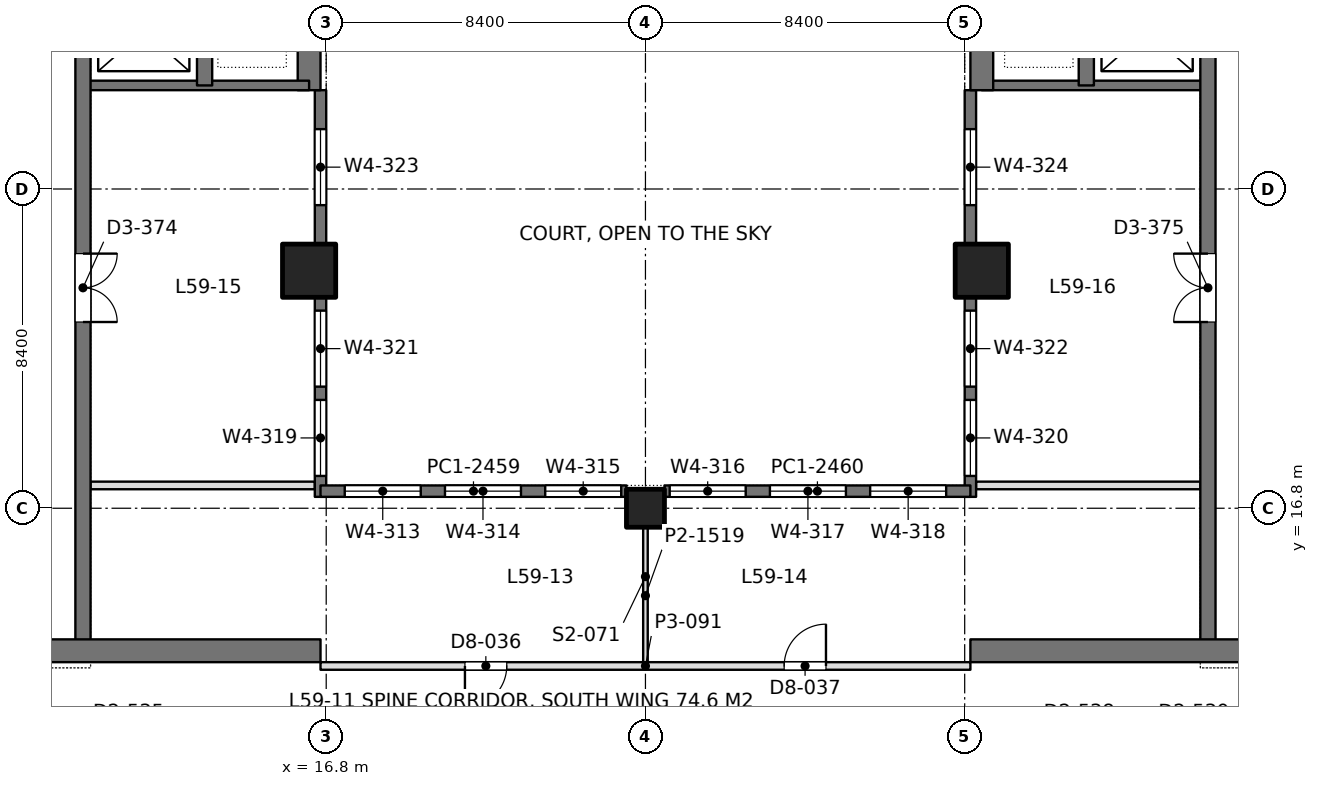
"""IFC4 building model, lengths in metres.
Left out: names, types, materials, properties, quantities, classifications, styles, units other than length and angle.
Written with IfcOpenShell. Run it as: python <this file> out.ifc"""

import sys

from ifc_helpers import new_model, si_unit, direction, frame, frame_2d, origin, origin_2d, place, context, subcontext, project, spatial, rectangle, extrude, element, fill, save


model = new_model("IFC4")
c1 = context("Model", 3, precision=1e-05, world=origin(), true_north=direction((0.0, 1.0)))
c2 = subcontext(c1, "Body", "Model", "MODEL_VIEW")
j1 = project(units=[si_unit("LENGTHUNIT", "METRE"), si_unit("PLANEANGLEUNIT", "RADIAN")], contexts=[c1])
p1 = place(None, origin())
s1 = spatial("IfcSite", under=j1, at=p1, CompositionType="ELEMENT")
p2 = place(p1, origin())
s2 = spatial("IfcBuilding", under=s1, at=p2, CompositionType="ELEMENT")
p3 = place(p2, frame((0.0, 0.0, 259.2)))
s3 = spatial("IfcBuildingStorey", under=s2, at=p3, CompositionType="ELEMENT", Elevation=259.2)
p4 = place(p3, frame((25.2, 16.8, 0.0), z_axis=(0.0, 0.0, 1.0), x_axis=(1.0, 0.0, 0.0)))
e1 = element("IfcColumn", 1, at=p4, inside=s3, PredefinedType="COLUMN", context=c2, shape_type="SweptSolid", body=[
    extrude(rectangle(XDim=1.0, YDim=1.0, at=origin_2d()), origin(), (0.0, 0.0, 1.0), 4.5),
])
for number, where, z_axis, x_axis in (
    (2, (16.35, 23.05, 0.0), (0.0, 0.0, 1.0), (1.0, 0.0, 0.0)),
    (3, (34.05, 23.05, 0.0), (0.0, 0.0, 1.0), (1.0, 0.0, 0.0)),
):
    element("IfcColumn", number, at=place(p3, frame(where, z_axis=z_axis, x_axis=x_axis)), inside=s3, PredefinedType="COLUMN", context=c2, shape_type="SweptSolid", body=[
        extrude(rectangle(XDim=1.4, YDim=1.4, at=origin_2d()), origin(), (0.0, 0.0, 1.0), 4.5),
    ])
p5 = place(p3, frame((-1.05, 13.05, 0.0), z_axis=(0.0, 0.0, 1.0), x_axis=(1.0, 0.0, 0.0)))
e4 = element("IfcWall", 4, at=p5, inside=s3, PredefinedType="SHEAR", context=c2, shape_type="SweptSolid", body=[
    extrude(rectangle(XDim=17.7, YDim=0.6, at=frame_2d((8.85, 0.0))), origin(), (0.0, 0.0, 1.0), 4.5),
])
p6 = place(p5, frame((8.8, 0.0, 0.0)))
e5 = element("IfcOpeningElement", 5, at=p6, cuts=e4, PredefinedType="OPENING", context=c2, shape_type="SweptSolid", body=[
    extrude(rectangle(XDim=1.8, YDim=2.4, at=frame_2d((0.9, 1.2))), frame((0.0, 0.31, 0.0), z_axis=(0.0, -1.0, 0.0), x_axis=(1.0, 0.0, 0.0)), (0.0, 0.0, 1.0), 0.62),
])
p7 = place(p3, frame((16.35, 27.8, 0.0), z_axis=(0.0, 0.0, 1.0), x_axis=(0.0, 1.0, 0.0)))
e6 = element("IfcWall", 6, at=p7, inside=s3, PredefinedType="SHEAR", context=c2, shape_type="SweptSolid", body=[
    extrude(rectangle(XDim=9.55, YDim=0.6, at=frame_2d((4.775, 0.0))), origin(), (0.0, 0.0, 1.0), 4.5),
])
p8 = place(p3, frame((10.4, 13.05, 0.0), z_axis=(0.0, 0.0, 1.0), x_axis=(0.0, 1.0, 0.0)))
e7 = element("IfcWall", 7, at=p8, inside=s3, PredefinedType="SHEAR", context=c2, shape_type="SweptSolid", body=[
    extrude(rectangle(XDim=24.3, YDim=0.4, at=frame_2d((12.15, 0.0))), origin(), (0.0, 0.0, 1.0), 4.5),
])
p9 = place(p8, frame((15.75, 0.0, 0.0)))
e8 = element("IfcOpeningElement", 8, at=p9, cuts=e7, PredefinedType="OPENING", context=c2, shape_type="SweptSolid", body=[
    extrude(rectangle(XDim=1.1, YDim=2.2, at=frame_2d((0.55, 1.1))), frame((0.0, 0.21, 0.0), z_axis=(0.0, -1.0, 0.0), x_axis=(1.0, 0.0, 0.0)), (0.0, 0.0, 1.0), 0.42),
])
p10 = place(p8, frame((18.6, 0.0, 0.0)))
e9 = element("IfcOpeningElement", 9, at=p10, cuts=e7, PredefinedType="OPENING", context=c2, shape_type="SweptSolid", body=[
    extrude(rectangle(XDim=1.1, YDim=2.2, at=frame_2d((0.55, 1.1))), frame((0.0, 0.21, 0.0), z_axis=(0.0, -1.0, 0.0), x_axis=(1.0, 0.0, 0.0)), (0.0, 0.0, 1.0), 0.42),
])
p11 = place(p8, frame((21.45, 0.0, 0.0)))
e10 = element("IfcOpeningElement", 10, at=p11, cuts=e7, PredefinedType="OPENING", context=c2, shape_type="SweptSolid", body=[
    extrude(rectangle(XDim=1.1, YDim=2.2, at=frame_2d((0.55, 1.1))), frame((0.0, 0.21, 0.0), z_axis=(0.0, -1.0, 0.0), x_axis=(1.0, 0.0, 0.0)), (0.0, 0.0, 1.0), 0.42),
])
p12 = place(p8, frame((8.65, 0.0, 0.0)))
e11 = element("IfcOpeningElement", 11, at=p12, cuts=e7, PredefinedType="OPENING", context=c2, shape_type="SweptSolid", body=[
    extrude(rectangle(XDim=1.8, YDim=2.4, at=frame_2d((0.9, 1.2))), frame((0.0, 0.21, 0.0), z_axis=(0.0, -1.0, 0.0), x_axis=(1.0, 0.0, 0.0)), (0.0, 0.0, 1.0), 0.42),
])
p13 = place(p3, frame((13.6, 27.925, 0.0), z_axis=(0.0, 0.0, 1.0), x_axis=(0.0, 1.0, 0.0)))
e12 = element("IfcWall", 12, at=p13, inside=s3, PredefinedType="SHEAR", context=c2, shape_type="SweptSolid", body=[
    extrude(rectangle(XDim=9.425, YDim=0.4, at=frame_2d((4.712, 0.0))), origin(), (0.0, 0.0, 1.0), 4.5),
])
p14 = place(p3, frame((10.4, 27.925, 0.0), z_axis=(0.0, 0.0, 1.0), x_axis=(1.0, 0.0, 0.0)))
e13 = element("IfcWall", 13, at=p14, inside=s3, PredefinedType="SHEAR", context=c2, shape_type="SweptSolid", body=[
    extrude(rectangle(XDim=5.95, YDim=0.25, at=frame_2d((2.975, 0.0))), origin(), (0.0, 0.0, 1.0), 4.5),
])
p15 = place(p3, frame((33.75, 13.05, 0.0), z_axis=(0.0, 0.0, 1.0), x_axis=(1.0, 0.0, 0.0)))
e14 = element("IfcWall", 14, at=p15, inside=s3, PredefinedType="SHEAR", context=c2, shape_type="SweptSolid", body=[
    extrude(rectangle(XDim=17.7, YDim=0.6, at=frame_2d((8.85, 0.0))), origin(), (0.0, 0.0, 1.0), 4.5),
])
p16 = place(p15, frame((7.1, 0.0, 0.0)))
e15 = element("IfcOpeningElement", 15, at=p16, cuts=e14, PredefinedType="OPENING", context=c2, shape_type="SweptSolid", body=[
    extrude(rectangle(XDim=1.8, YDim=2.4, at=frame_2d((0.9, 1.2))), frame((0.0, 0.31, 0.0), z_axis=(0.0, -1.0, 0.0), x_axis=(1.0, 0.0, 0.0)), (0.0, 0.0, 1.0), 0.62),
])
p17 = place(p3, frame((34.05, 27.8, 0.0), z_axis=(0.0, 0.0, 1.0), x_axis=(0.0, 1.0, 0.0)))
e16 = element("IfcWall", 16, at=p17, inside=s3, PredefinedType="SHEAR", context=c2, shape_type="SweptSolid", body=[
    extrude(rectangle(XDim=9.55, YDim=0.6, at=frame_2d((4.775, 0.0))), origin(), (0.0, 0.0, 1.0), 4.5),
])
p18 = place(p3, frame((40.0, 13.05, 0.0), z_axis=(0.0, 0.0, 1.0), x_axis=(0.0, 1.0, 0.0)))
e17 = element("IfcWall", 17, at=p18, inside=s3, PredefinedType="SHEAR", context=c2, shape_type="SweptSolid", body=[
    extrude(rectangle(XDim=24.3, YDim=0.4, at=frame_2d((12.15, 0.0))), origin(), (0.0, 0.0, 1.0), 4.5),
])
p19 = place(p18, frame((15.75, 0.0, 0.0)))
e18 = element("IfcOpeningElement", 18, at=p19, cuts=e17, PredefinedType="OPENING", context=c2, shape_type="SweptSolid", body=[
    extrude(rectangle(XDim=1.1, YDim=2.2, at=frame_2d((0.55, 1.1))), frame((0.0, 0.21, 0.0), z_axis=(0.0, -1.0, 0.0), x_axis=(1.0, 0.0, 0.0)), (0.0, 0.0, 1.0), 0.42),
])
p20 = place(p18, frame((18.6, 0.0, 0.0)))
e19 = element("IfcOpeningElement", 19, at=p20, cuts=e17, PredefinedType="OPENING", context=c2, shape_type="SweptSolid", body=[
    extrude(rectangle(XDim=1.1, YDim=2.2, at=frame_2d((0.55, 1.1))), frame((0.0, 0.21, 0.0), z_axis=(0.0, -1.0, 0.0), x_axis=(1.0, 0.0, 0.0)), (0.0, 0.0, 1.0), 0.42),
])
p21 = place(p18, frame((21.45, 0.0, 0.0)))
e20 = element("IfcOpeningElement", 20, at=p21, cuts=e17, PredefinedType="OPENING", context=c2, shape_type="SweptSolid", body=[
    extrude(rectangle(XDim=1.1, YDim=2.2, at=frame_2d((0.55, 1.1))), frame((0.0, 0.21, 0.0), z_axis=(0.0, -1.0, 0.0), x_axis=(1.0, 0.0, 0.0)), (0.0, 0.0, 1.0), 0.42),
])
p22 = place(p18, frame((8.65, 0.0, 0.0)))
e21 = element("IfcOpeningElement", 21, at=p22, cuts=e17, PredefinedType="OPENING", context=c2, shape_type="SweptSolid", body=[
    extrude(rectangle(XDim=1.8, YDim=2.4, at=frame_2d((0.9, 1.2))), frame((0.0, 0.21, 0.0), z_axis=(0.0, -1.0, 0.0), x_axis=(1.0, 0.0, 0.0)), (0.0, 0.0, 1.0), 0.42),
])
p23 = place(p3, frame((36.8, 27.925, 0.0), z_axis=(0.0, 0.0, 1.0), x_axis=(0.0, 1.0, 0.0)))
e22 = element("IfcWall", 22, at=p23, inside=s3, PredefinedType="SHEAR", context=c2, shape_type="SweptSolid", body=[
    extrude(rectangle(XDim=9.425, YDim=0.4, at=frame_2d((4.712, 0.0))), origin(), (0.0, 0.0, 1.0), 4.5),
])
p24 = place(p3, frame((40.0, 27.925, 0.0), z_axis=(0.0, 0.0, 1.0), x_axis=(-1.0, 0.0, 0.0)))
e23 = element("IfcWall", 23, at=p24, inside=s3, PredefinedType="SHEAR", context=c2, shape_type="SweptSolid", body=[
    extrude(rectangle(XDim=5.95, YDim=0.25, at=frame_2d((2.975, 0.0))), origin(), (0.0, 0.0, 1.0), 4.5),
])
p25 = place(p3, frame((16.65, 17.1, 0.0), z_axis=(0.0, 0.0, 1.0), x_axis=(0.0, 1.0, 0.0)))
e24 = element("IfcWall", 24, at=p25, inside=s3, PredefinedType="SOLIDWALL", context=c2, shape_type="SweptSolid", body=[
    extrude(rectangle(XDim=10.7, YDim=0.3, at=frame_2d((5.35, 0.0))), origin(), (0.0, 0.0, 1.0), 4.35),
])
p26 = place(p25, frame((0.55, 0.0, 0.9)))
e25 = element("IfcOpeningElement", 25, at=p26, cuts=e24, PredefinedType="OPENING", context=c2, shape_type="SweptSolid", body=[
    extrude(rectangle(XDim=2.0, YDim=1.9, at=frame_2d((1.0, 0.95))), frame((0.0, 0.16, 0.0), z_axis=(0.0, -1.0, 0.0), x_axis=(1.0, 0.0, 0.0)), (0.0, 0.0, 1.0), 0.32),
])
p27 = place(p25, frame((2.9, 0.0, 0.9)))
e26 = element("IfcOpeningElement", 26, at=p27, cuts=e24, PredefinedType="OPENING", context=c2, shape_type="SweptSolid", body=[
    extrude(rectangle(XDim=2.0, YDim=1.9, at=frame_2d((1.0, 0.95))), frame((0.0, 0.16, 0.0), z_axis=(0.0, -1.0, 0.0), x_axis=(1.0, 0.0, 0.0)), (0.0, 0.0, 1.0), 0.32),
])
p28 = place(p25, frame((7.675, 0.0, 0.9)))
e27 = element("IfcOpeningElement", 27, at=p28, cuts=e24, PredefinedType="OPENING", context=c2, shape_type="SweptSolid", body=[
    extrude(rectangle(XDim=2.0, YDim=1.9, at=frame_2d((1.0, 0.95))), frame((0.0, 0.16, 0.0), z_axis=(0.0, -1.0, 0.0), x_axis=(1.0, 0.0, 0.0)), (0.0, 0.0, 1.0), 0.32),
])
p29 = place(p3, frame((33.75, 17.1, 0.0), z_axis=(0.0, 0.0, 1.0), x_axis=(0.0, 1.0, 0.0)))
e28 = element("IfcWall", 28, at=p29, inside=s3, PredefinedType="SOLIDWALL", context=c2, shape_type="SweptSolid", body=[
    extrude(rectangle(XDim=10.7, YDim=0.3, at=frame_2d((5.35, 0.0))), origin(), (0.0, 0.0, 1.0), 4.35),
])
p30 = place(p29, frame((0.55, 0.0, 0.9)))
e29 = element("IfcOpeningElement", 29, at=p30, cuts=e28, PredefinedType="OPENING", context=c2, shape_type="SweptSolid", body=[
    extrude(rectangle(XDim=2.0, YDim=1.9, at=frame_2d((1.0, 0.95))), frame((0.0, 0.16, 0.0), z_axis=(0.0, -1.0, 0.0), x_axis=(1.0, 0.0, 0.0)), (0.0, 0.0, 1.0), 0.32),
])
p31 = place(p29, frame((2.9, 0.0, 0.9)))
e30 = element("IfcOpeningElement", 30, at=p31, cuts=e28, PredefinedType="OPENING", context=c2, shape_type="SweptSolid", body=[
    extrude(rectangle(XDim=2.0, YDim=1.9, at=frame_2d((1.0, 0.95))), frame((0.0, 0.16, 0.0), z_axis=(0.0, -1.0, 0.0), x_axis=(1.0, 0.0, 0.0)), (0.0, 0.0, 1.0), 0.32),
])
p32 = place(p29, frame((7.675, 0.0, 0.9)))
e31 = element("IfcOpeningElement", 31, at=p32, cuts=e28, PredefinedType="OPENING", context=c2, shape_type="SweptSolid", body=[
    extrude(rectangle(XDim=2.0, YDim=1.9, at=frame_2d((1.0, 0.95))), frame((0.0, 0.16, 0.0), z_axis=(0.0, -1.0, 0.0), x_axis=(1.0, 0.0, 0.0)), (0.0, 0.0, 1.0), 0.32),
])
p33 = place(p3, frame((16.65, 17.25, 0.0), z_axis=(0.0, 0.0, 1.0), x_axis=(1.0, 0.0, 0.0)))
e32 = element("IfcWall", 32, at=p33, inside=s3, PredefinedType="SOLIDWALL", context=c2, shape_type="SweptSolid", body=[
    extrude(rectangle(XDim=8.05, YDim=0.3, at=frame_2d((4.025, 0.0))), origin(), (0.0, 0.0, 1.0), 4.35),
])
p34 = place(p33, frame((0.637, 0.0, 0.9)))
e33 = element("IfcOpeningElement", 33, at=p34, cuts=e32, PredefinedType="OPENING", context=c2, shape_type="SweptSolid", body=[
    extrude(rectangle(XDim=2.0, YDim=1.9, at=frame_2d((1.0, 0.95))), frame((0.0, 0.16, 0.0), z_axis=(0.0, -1.0, 0.0), x_axis=(1.0, 0.0, 0.0)), (0.0, 0.0, 1.0), 0.32),
])
p35 = place(p33, frame((3.275, 0.0, 0.9)))
e34 = element("IfcOpeningElement", 34, at=p35, cuts=e32, PredefinedType="OPENING", context=c2, shape_type="SweptSolid", body=[
    extrude(rectangle(XDim=2.0, YDim=1.9, at=frame_2d((1.0, 0.95))), frame((0.0, 0.16, 0.0), z_axis=(0.0, -1.0, 0.0), x_axis=(1.0, 0.0, 0.0)), (0.0, 0.0, 1.0), 0.32),
])
p36 = place(p33, frame((5.913, 0.0, 0.9)))
e35 = element("IfcOpeningElement", 35, at=p36, cuts=e32, PredefinedType="OPENING", context=c2, shape_type="SweptSolid", body=[
    extrude(rectangle(XDim=2.0, YDim=1.9, at=frame_2d((1.0, 0.95))), frame((0.0, 0.16, 0.0), z_axis=(0.0, -1.0, 0.0), x_axis=(1.0, 0.0, 0.0)), (0.0, 0.0, 1.0), 0.32),
])
p37 = place(p3, frame((25.7, 17.25, 0.0), z_axis=(0.0, 0.0, 1.0), x_axis=(1.0, 0.0, 0.0)))
e36 = element("IfcWall", 36, at=p37, inside=s3, PredefinedType="SOLIDWALL", context=c2, shape_type="SweptSolid", body=[
    extrude(rectangle(XDim=8.05, YDim=0.3, at=frame_2d((4.025, 0.0))), origin(), (0.0, 0.0, 1.0), 4.35),
])
p38 = place(p37, frame((0.137, 0.0, 0.9)))
e37 = element("IfcOpeningElement", 37, at=p38, cuts=e36, PredefinedType="OPENING", context=c2, shape_type="SweptSolid", body=[
    extrude(rectangle(XDim=2.0, YDim=1.9, at=frame_2d((1.0, 0.95))), frame((0.0, 0.16, 0.0), z_axis=(0.0, -1.0, 0.0), x_axis=(1.0, 0.0, 0.0)), (0.0, 0.0, 1.0), 0.32),
])
p39 = place(p37, frame((2.775, 0.0, 0.9)))
e38 = element("IfcOpeningElement", 38, at=p39, cuts=e36, PredefinedType="OPENING", context=c2, shape_type="SweptSolid", body=[
    extrude(rectangle(XDim=2.0, YDim=1.9, at=frame_2d((1.0, 0.95))), frame((0.0, 0.16, 0.0), z_axis=(0.0, -1.0, 0.0), x_axis=(1.0, 0.0, 0.0)), (0.0, 0.0, 1.0), 0.32),
])
p40 = place(p37, frame((5.413, 0.0, 0.9)))
e39 = element("IfcOpeningElement", 39, at=p40, cuts=e36, PredefinedType="OPENING", context=c2, shape_type="SweptSolid", body=[
    extrude(rectangle(XDim=2.0, YDim=1.9, at=frame_2d((1.0, 0.95))), frame((0.0, 0.16, 0.0), z_axis=(0.0, -1.0, 0.0), x_axis=(1.0, 0.0, 0.0)), (0.0, 0.0, 1.0), 0.32),
])
for number, where, z_axis, x_axis in (
    (40, (10.598, 17.4, 0.0), (0.0, 0.0, 1.0), (1.0, 0.0, 0.0)),
    (41, (33.898, 17.4, 0.0), (0.0, 0.0, 1.0), (1.0, 0.0, 0.0)),
):
    element("IfcWall", number, at=place(p3, frame(where, z_axis=z_axis, x_axis=x_axis)), inside=s3, PredefinedType="PARTITIONING", context=c2, shape_type="SweptSolid", body=[
        extrude(rectangle(XDim=5.904, YDim=0.2, at=frame_2d((2.952, 0.0))), origin(), (0.0, 0.0, 1.0), 3.8),
    ])
p41 = place(p3, frame((25.2, 12.698, 0.0), z_axis=(0.0, 0.0, 1.0), x_axis=(0.0, 1.0, 0.0)))
e42 = element("IfcWall", 42, at=p41, inside=s3, PredefinedType="PARTITIONING", context=c2, shape_type="SweptSolid", body=[
    extrude(rectangle(XDim=3.603, YDim=0.12, at=frame_2d((1.802, 0.0))), origin(), (0.0, 0.0, 1.0), 3.8),
])
p42 = place(p3, frame((16.65, 12.65, 0.0), z_axis=(0.0, 0.0, 1.0), x_axis=(1.0, 0.0, 0.0)))
e43 = element("IfcWall", 43, at=p42, inside=s3, PredefinedType="PARTITIONING", context=c2, shape_type="SweptSolid", body=[
    extrude(rectangle(XDim=17.1, YDim=0.2, at=frame_2d((8.55, 0.0))), origin(), (0.0, 0.0, 1.0), 3.8),
])
p43 = place(p42, frame((3.8, 0.0, 0.0)))
e44 = element("IfcOpeningElement", 44, at=p43, cuts=e43, PredefinedType="OPENING", context=c2, shape_type="SweptSolid", body=[
    extrude(rectangle(XDim=1.1, YDim=2.4, at=frame_2d((0.55, 1.2))), frame((0.0, 0.11, 0.0), z_axis=(0.0, -1.0, 0.0), x_axis=(1.0, 0.0, 0.0)), (0.0, 0.0, 1.0), 0.22),
])
p44 = place(p42, frame((12.2, 0.0, 0.0)))
e45 = element("IfcOpeningElement", 45, at=p44, cuts=e43, PredefinedType="OPENING", context=c2, shape_type="SweptSolid", body=[
    extrude(rectangle(XDim=1.1, YDim=2.4, at=frame_2d((0.55, 1.2))), frame((0.0, 0.11, 0.0), z_axis=(0.0, -1.0, 0.0), x_axis=(1.0, 0.0, 0.0)), (0.0, 0.0, 1.0), 0.22),
])
p45 = place(p26, origin())
e46 = element("IfcWindow", 46, at=p45, inside=s3, PartitioningType="SINGLE_PANEL", PredefinedType="WINDOW", context=c2, shape_type="SweptSolid", body=[
    extrude(rectangle(XDim=2.0, YDim=1.9, at=frame_2d((1.0, 0.95))), frame((0.0, 0.03, 0.0), z_axis=(0.0, -1.0, 0.0), x_axis=(1.0, 0.0, 0.0)), (0.0, 0.0, 1.0), 0.06),
])
fill(e25, e46)
p46 = place(p27, origin())
e47 = element("IfcWindow", 47, at=p46, inside=s3, PartitioningType="SINGLE_PANEL", PredefinedType="WINDOW", context=c2, shape_type="SweptSolid", body=[
    extrude(rectangle(XDim=2.0, YDim=1.9, at=frame_2d((1.0, 0.95))), frame((0.0, 0.03, 0.0), z_axis=(0.0, -1.0, 0.0), x_axis=(1.0, 0.0, 0.0)), (0.0, 0.0, 1.0), 0.06),
])
fill(e26, e47)
p47 = place(p28, origin())
e48 = element("IfcWindow", 48, at=p47, inside=s3, PartitioningType="SINGLE_PANEL", PredefinedType="WINDOW", context=c2, shape_type="SweptSolid", body=[
    extrude(rectangle(XDim=2.0, YDim=1.9, at=frame_2d((1.0, 0.95))), frame((0.0, 0.03, 0.0), z_axis=(0.0, -1.0, 0.0), x_axis=(1.0, 0.0, 0.0)), (0.0, 0.0, 1.0), 0.06),
])
fill(e27, e48)
p48 = place(p30, origin())
e49 = element("IfcWindow", 49, at=p48, inside=s3, PartitioningType="SINGLE_PANEL", PredefinedType="WINDOW", context=c2, shape_type="SweptSolid", body=[
    extrude(rectangle(XDim=2.0, YDim=1.9, at=frame_2d((1.0, 0.95))), frame((0.0, 0.03, 0.0), z_axis=(0.0, -1.0, 0.0), x_axis=(1.0, 0.0, 0.0)), (0.0, 0.0, 1.0), 0.06),
])
fill(e29, e49)
p49 = place(p31, origin())
e50 = element("IfcWindow", 50, at=p49, inside=s3, PartitioningType="SINGLE_PANEL", PredefinedType="WINDOW", context=c2, shape_type="SweptSolid", body=[
    extrude(rectangle(XDim=2.0, YDim=1.9, at=frame_2d((1.0, 0.95))), frame((0.0, 0.03, 0.0), z_axis=(0.0, -1.0, 0.0), x_axis=(1.0, 0.0, 0.0)), (0.0, 0.0, 1.0), 0.06),
])
fill(e30, e50)
p50 = place(p32, origin())
e51 = element("IfcWindow", 51, at=p50, inside=s3, PartitioningType="SINGLE_PANEL", PredefinedType="WINDOW", context=c2, shape_type="SweptSolid", body=[
    extrude(rectangle(XDim=2.0, YDim=1.9, at=frame_2d((1.0, 0.95))), frame((0.0, 0.03, 0.0), z_axis=(0.0, -1.0, 0.0), x_axis=(1.0, 0.0, 0.0)), (0.0, 0.0, 1.0), 0.06),
])
fill(e31, e51)
p51 = place(p34, origin())
e52 = element("IfcWindow", 52, at=p51, inside=s3, PartitioningType="SINGLE_PANEL", PredefinedType="WINDOW", context=c2, shape_type="SweptSolid", body=[
    extrude(rectangle(XDim=2.0, YDim=1.9, at=frame_2d((1.0, 0.95))), frame((0.0, 0.03, 0.0), z_axis=(0.0, -1.0, 0.0), x_axis=(1.0, 0.0, 0.0)), (0.0, 0.0, 1.0), 0.06),
])
fill(e33, e52)
p52 = place(p35, origin())
e53 = element("IfcWindow", 53, at=p52, inside=s3, PartitioningType="SINGLE_PANEL", PredefinedType="WINDOW", context=c2, shape_type="SweptSolid", body=[
    extrude(rectangle(XDim=2.0, YDim=1.9, at=frame_2d((1.0, 0.95))), frame((0.0, 0.03, 0.0), z_axis=(0.0, -1.0, 0.0), x_axis=(1.0, 0.0, 0.0)), (0.0, 0.0, 1.0), 0.06),
])
fill(e34, e53)
p53 = place(p36, origin())
e54 = element("IfcWindow", 54, at=p53, inside=s3, PartitioningType="SINGLE_PANEL", PredefinedType="WINDOW", context=c2, shape_type="SweptSolid", body=[
    extrude(rectangle(XDim=2.0, YDim=1.9, at=frame_2d((1.0, 0.95))), frame((0.0, 0.03, 0.0), z_axis=(0.0, -1.0, 0.0), x_axis=(1.0, 0.0, 0.0)), (0.0, 0.0, 1.0), 0.06),
])
fill(e35, e54)
p54 = place(p38, origin())
e55 = element("IfcWindow", 55, at=p54, inside=s3, PartitioningType="SINGLE_PANEL", PredefinedType="WINDOW", context=c2, shape_type="SweptSolid", body=[
    extrude(rectangle(XDim=2.0, YDim=1.9, at=frame_2d((1.0, 0.95))), frame((0.0, 0.03, 0.0), z_axis=(0.0, -1.0, 0.0), x_axis=(1.0, 0.0, 0.0)), (0.0, 0.0, 1.0), 0.06),
])
fill(e37, e55)
p55 = place(p39, origin())
e56 = element("IfcWindow", 56, at=p55, inside=s3, PartitioningType="SINGLE_PANEL", PredefinedType="WINDOW", context=c2, shape_type="SweptSolid", body=[
    extrude(rectangle(XDim=2.0, YDim=1.9, at=frame_2d((1.0, 0.95))), frame((0.0, 0.03, 0.0), z_axis=(0.0, -1.0, 0.0), x_axis=(1.0, 0.0, 0.0)), (0.0, 0.0, 1.0), 0.06),
])
fill(e38, e56)
p56 = place(p40, origin())
e57 = element("IfcWindow", 57, at=p56, inside=s3, PartitioningType="SINGLE_PANEL", PredefinedType="WINDOW", context=c2, shape_type="SweptSolid", body=[
    extrude(rectangle(XDim=2.0, YDim=1.9, at=frame_2d((1.0, 0.95))), frame((0.0, 0.03, 0.0), z_axis=(0.0, -1.0, 0.0), x_axis=(1.0, 0.0, 0.0)), (0.0, 0.0, 1.0), 0.06),
])
fill(e39, e57)
p57 = place(p12, frame((1.8, 0.0, 0.0), z_axis=(0.0, 0.0, 1.0), x_axis=(-1.0, 0.0, 0.0)))
e58 = element("IfcDoor", 58, at=p57, inside=s3, OperationType="DOUBLE_DOOR_SINGLE_SWING", PredefinedType="DOOR", context=c2, shape_type="SweptSolid", body=[
    extrude(rectangle(XDim=1.8, YDim=2.4, at=frame_2d((0.9, 1.2))), frame((0.0, 0.025, 0.0), z_axis=(0.0, -1.0, 0.0), x_axis=(1.0, 0.0, 0.0)), (0.0, 0.0, 1.0), 0.05),
])
fill(e11, e58)
p58 = place(p22, origin())
e59 = element("IfcDoor", 59, at=p58, inside=s3, OperationType="DOUBLE_DOOR_SINGLE_SWING", PredefinedType="DOOR", context=c2, shape_type="SweptSolid", body=[
    extrude(rectangle(XDim=1.8, YDim=2.4, at=frame_2d((0.9, 1.2))), frame((0.0, 0.025, 0.0), z_axis=(0.0, -1.0, 0.0), x_axis=(1.0, 0.0, 0.0)), (0.0, 0.0, 1.0), 0.05),
])
fill(e21, e59)
p59 = place(p43, frame((1.1, 0.0, 0.0), z_axis=(0.0, 0.0, 1.0), x_axis=(-1.0, 0.0, 0.0)))
e60 = element("IfcDoor", 60, at=p59, inside=s3, OperationType="SINGLE_SWING_RIGHT", PredefinedType="DOOR", context=c2, shape_type="SweptSolid", body=[
    extrude(rectangle(XDim=1.1, YDim=2.4, at=frame_2d((0.55, 1.2))), frame((0.0, 0.025, 0.0), z_axis=(0.0, -1.0, 0.0), x_axis=(1.0, 0.0, 0.0)), (0.0, 0.0, 1.0), 0.05),
])
fill(e44, e60)
p60 = place(p44, origin())
e61 = element("IfcDoor", 61, at=p60, inside=s3, OperationType="SINGLE_SWING_RIGHT", PredefinedType="DOOR", context=c2, shape_type="SweptSolid", body=[
    extrude(rectangle(XDim=1.1, YDim=2.4, at=frame_2d((0.55, 1.2))), frame((0.0, 0.025, 0.0), z_axis=(0.0, -1.0, 0.0), x_axis=(1.0, 0.0, 0.0)), (0.0, 0.0, 1.0), 0.05),
])
fill(e45, e61)
save(model, sys.argv[1])
